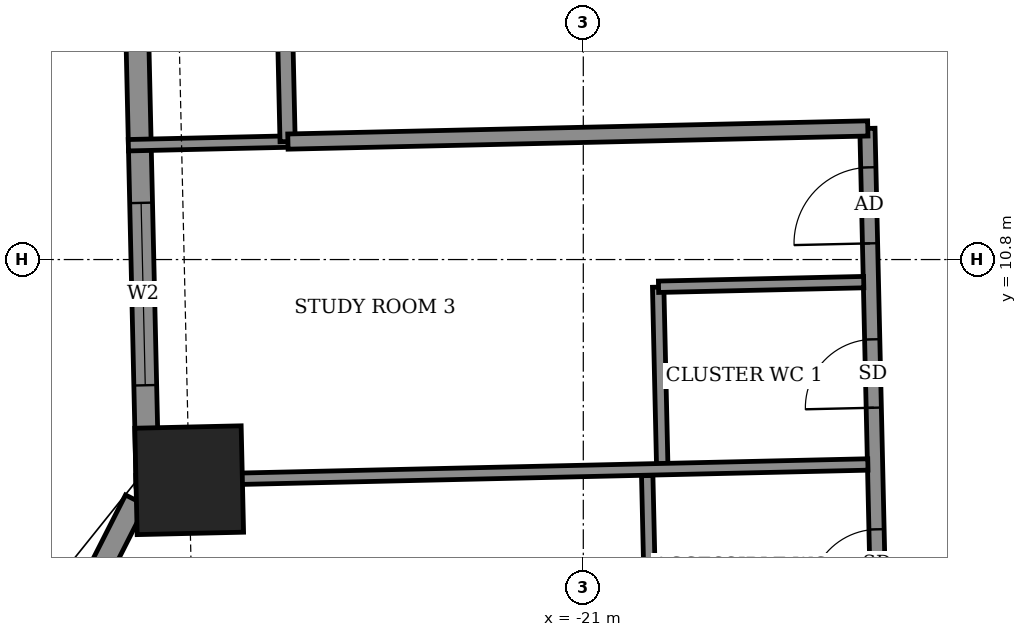
"""IFC4 building model, lengths in metres.
Left out: names, types, materials, properties, quantities, classifications, styles, units other than length and angle.
Written with IfcOpenShell. Run it as: python <this file> out.ifc"""

import sys

from ifc_helpers import new_model, si_unit, direction, frame, frame_2d, origin, origin_2d, place, context, subcontext, project, spatial, rectangle, extrude, element, fill, save


model = new_model("IFC4")
c1 = context("Model", 3, precision=1e-05, world=origin(), true_north=direction((0.0, 1.0)))
c2 = subcontext(c1, "Body", "Model", "MODEL_VIEW")
j1 = project(units=[si_unit("LENGTHUNIT", "METRE"), si_unit("PLANEANGLEUNIT", "RADIAN")], contexts=[c1])
p1 = place(None, origin())
s1 = spatial("IfcSite", under=j1, at=p1, CompositionType="ELEMENT")
p2 = place(p1, origin())
s2 = spatial("IfcBuilding", under=s1, at=p2, CompositionType="ELEMENT")
p3 = place(p2, frame((0.0, 0.0, 93.7)))
s3 = spatial("IfcBuildingStorey", under=s2, at=p3, CompositionType="ELEMENT", Elevation=93.7)
p4 = place(p3, frame((-26.185, 7.897, -0.55), z_axis=(0.0, 0.0, 1.0), x_axis=(0.022675887158, -0.999742869013, 0.0)))
e1 = element("IfcColumn", 1, at=p4, inside=s3, PredefinedType="COLUMN", context=c2, shape_type="SweptSolid", body=[
    extrude(rectangle(XDim=1.4, YDim=1.4, at=origin_2d()), origin(), (0.0, 0.0, 1.0), 3.6),
])
p5 = place(p3, frame((-27.036, 21.155, 0.0), z_axis=(0.0, 0.0, 1.0), x_axis=(0.022730142562, -0.999741636934, 0.0)))
e2 = element("IfcWall", 2, at=p5, inside=s3, PredefinedType="SOLIDWALL", context=c2, shape_type="SweptSolid", body=[
    extrude(rectangle(XDim=13.329, YDim=0.3, at=frame_2d((6.665, 0.0))), origin(), (0.0, 0.0, 1.0), 3.05),
])
p6 = place(p5, frame((2.805, 0.0, 0.0)))
e3 = element("IfcOpeningElement", 3, at=p6, cuts=e2, PredefinedType="OPENING", context=c2, shape_type="SweptSolid", body=[
    extrude(rectangle(XDim=1.5, YDim=2.4, at=frame_2d((0.75, 1.2))), frame((0.0, 0.16, 0.0), z_axis=(0.0, -1.0, 0.0), x_axis=(1.0, 0.0, 0.0)), (0.0, 0.0, 1.0), 0.32),
])
p7 = place(p5, frame((9.612, 0.0, 0.9)))
e4 = element("IfcOpeningElement", 4, at=p7, cuts=e2, PredefinedType="OPENING", context=c2, shape_type="SweptSolid", body=[
    extrude(rectangle(XDim=2.4, YDim=1.5, at=frame_2d((1.2, 0.75))), frame((0.0, 0.16, 0.0), z_axis=(0.0, -1.0, 0.0), x_axis=(1.0, 0.0, 0.0)), (0.0, 0.0, 1.0), 0.32),
])
p8 = place(p3, frame((-26.889, 7.635, 0.0), z_axis=(0.0, 0.0, 1.0), x_axis=(-0.452633159278, -0.891696822425, 0.0)))
e5 = element("IfcWall", 5, at=p8, inside=s3, PredefinedType="SOLIDWALL", context=c2, shape_type="SweptSolid", body=[
    extrude(rectangle(XDim=5.397, YDim=0.3, at=frame_2d((2.699, 0.0))), origin(), (0.0, 0.0, 1.0), 3.05),
])
p9 = place(p8, frame((2.007, 0.0, 0.9)))
e6 = element("IfcOpeningElement", 6, at=p9, cuts=e5, PredefinedType="OPENING", context=c2, shape_type="SweptSolid", body=[
    extrude(rectangle(XDim=1.2, YDim=1.5, at=frame_2d((0.6, 0.75))), frame((0.0, 0.16, 0.0), z_axis=(0.0, -1.0, 0.0), x_axis=(1.0, 0.0, 0.0)), (0.0, 0.0, 1.0), 0.32),
])
p10 = place(p3, frame((-16.684, -12.919, 0.0), z_axis=(0.0, 0.0, 1.0), x_axis=(-0.022706151961, 0.999742182097, 0.0)))
e7 = element("IfcWall", 7, at=p10, inside=s3, PredefinedType="PARTITIONING", context=c2, shape_type="SweptSolid", body=[
    extrude(rectangle(XDim=25.45, YDim=0.2, at=frame_2d((12.725, 0.0))), origin(), (0.0, 0.0, 1.0), 3.05),
])
p11 = place(p10, frame((23.938, 0.0, 0.0)))
e8 = element("IfcOpeningElement", 8, at=p11, cuts=e7, PredefinedType="OPENING", context=c2, shape_type="SweptSolid", body=[
    extrude(rectangle(XDim=1.0, YDim=2.1, at=frame_2d((0.5, 1.05))), frame((0.0, 0.11, 0.0), z_axis=(0.0, -1.0, 0.0), x_axis=(1.0, 0.0, 0.0)), (0.0, 0.0, 1.0), 0.22),
])
p12 = place(p10, frame((21.775, 0.0, 0.0)))
e9 = element("IfcOpeningElement", 9, at=p12, cuts=e7, PredefinedType="OPENING", context=c2, shape_type="SweptSolid", body=[
    extrude(rectangle(XDim=0.9, YDim=2.1, at=frame_2d((0.45, 1.05))), frame((0.0, 0.11, 0.0), z_axis=(0.0, -1.0, 0.0), x_axis=(1.0, 0.0, 0.0)), (0.0, 0.0, 1.0), 0.22),
])
p13 = place(p10, frame((16.975, 0.0, 0.0)))
e10 = element("IfcOpeningElement", 10, at=p13, cuts=e7, PredefinedType="OPENING", context=c2, shape_type="SweptSolid", body=[
    extrude(rectangle(XDim=1.0, YDim=2.1, at=frame_2d((0.5, 1.05))), frame((0.0, 0.11, 0.0), z_axis=(0.0, -1.0, 0.0), x_axis=(1.0, 0.0, 0.0)), (0.0, 0.0, 1.0), 0.22),
])
p14 = place(p10, frame((19.275, 0.0, 0.0)))
e11 = element("IfcOpeningElement", 11, at=p14, cuts=e7, PredefinedType="OPENING", context=c2, shape_type="SweptSolid", body=[
    extrude(rectangle(XDim=0.9, YDim=2.1, at=frame_2d((0.45, 1.05))), frame((0.0, 0.11, 0.0), z_axis=(0.0, -1.0, 0.0), x_axis=(1.0, 0.0, 0.0)), (0.0, 0.0, 1.0), 0.22),
])
p15 = place(p10, frame((15.075, 0.0, 0.0)))
e12 = element("IfcOpeningElement", 12, at=p15, cuts=e7, PredefinedType="OPENING", context=c2, shape_type="SweptSolid", body=[
    extrude(rectangle(XDim=1.0, YDim=2.1, at=frame_2d((0.5, 1.05))), frame((0.0, 0.11, 0.0), z_axis=(0.0, -1.0, 0.0), x_axis=(1.0, 0.0, 0.0)), (0.0, 0.0, 1.0), 0.22),
])
p16 = place(p10, frame((12.975, 0.0, 0.0)))
e13 = element("IfcOpeningElement", 13, at=p16, cuts=e7, PredefinedType="OPENING", context=c2, shape_type="SweptSolid", body=[
    extrude(rectangle(XDim=0.9, YDim=2.1, at=frame_2d((0.45, 1.05))), frame((0.0, 0.11, 0.0), z_axis=(0.0, -1.0, 0.0), x_axis=(1.0, 0.0, 0.0)), (0.0, 0.0, 1.0), 0.22),
])
p17 = place(p10, frame((10.55, 0.0, 0.0)))
e14 = element("IfcOpeningElement", 14, at=p17, cuts=e7, PredefinedType="OPENING", context=c2, shape_type="SweptSolid", body=[
    extrude(rectangle(XDim=1.0, YDim=2.1, at=frame_2d((0.5, 1.05))), frame((0.0, 0.11, 0.0), z_axis=(0.0, -1.0, 0.0), x_axis=(1.0, 0.0, 0.0)), (0.0, 0.0, 1.0), 0.22),
])
p18 = place(p10, frame((8.125, 0.0, 0.0)))
e15 = element("IfcOpeningElement", 15, at=p18, cuts=e7, PredefinedType="OPENING", context=c2, shape_type="SweptSolid", body=[
    extrude(rectangle(XDim=0.9, YDim=2.1, at=frame_2d((0.45, 1.05))), frame((0.0, 0.11, 0.0), z_axis=(0.0, -1.0, 0.0), x_axis=(1.0, 0.0, 0.0)), (0.0, 0.0, 1.0), 0.22),
])
p19 = place(p10, frame((1.737, 0.0, 0.0)))
e16 = element("IfcOpeningElement", 16, at=p19, cuts=e7, PredefinedType="OPENING", context=c2, shape_type="SweptSolid", body=[
    extrude(rectangle(XDim=1.0, YDim=2.1, at=frame_2d((0.5, 1.05))), frame((0.0, 0.11, 0.0), z_axis=(0.0, -1.0, 0.0), x_axis=(1.0, 0.0, 0.0)), (0.0, 0.0, 1.0), 0.22),
])
p20 = place(p10, frame((5.425, 0.0, 0.0)))
e17 = element("IfcOpeningElement", 17, at=p20, cuts=e7, PredefinedType="OPENING", context=c2, shape_type="SweptSolid", body=[
    extrude(rectangle(XDim=0.9, YDim=2.1, at=frame_2d((0.45, 1.05))), frame((0.0, 0.11, 0.0), z_axis=(0.0, -1.0, 0.0), x_axis=(1.0, 0.0, 0.0)), (0.0, 0.0, 1.0), 0.22),
])
p21 = place(p3, frame((-20.101, 5.434, 0.0), z_axis=(0.0, 0.0, 1.0), x_axis=(-0.022919108675, 0.999737322729, 0.0)))
e18 = element("IfcWall", 18, at=p21, inside=s3, PredefinedType="PARTITIONING", context=c2, shape_type="SweptSolid", body=[
    extrude(rectangle(XDim=2.525, YDim=0.15, at=frame_2d((1.262, 0.0))), origin(), (0.0, 0.0, 1.0), 3.05),
])
p22 = place(p3, frame((-19.962, 8.112, 0.0), z_axis=(0.0, 0.0, 1.0), x_axis=(-0.022781023197, 0.999740478815, 0.0)))
e19 = element("IfcWall", 19, at=p22, inside=s3, PredefinedType="PARTITIONING", context=c2, shape_type="SweptSolid", body=[
    extrude(rectangle(XDim=2.325, YDim=0.15, at=frame_2d((1.163, 0.0))), origin(), (0.0, 0.0, 1.0), 3.05),
])
p23 = place(p3, frame((-26.885, 7.885, 0.0), z_axis=(0.0, 0.0, 1.0), x_axis=(0.999741468995, 0.022737527832, 0.0)))
e20 = element("IfcWall", 20, at=p23, inside=s3, PredefinedType="PARTITIONING", context=c2, shape_type="SweptSolid", body=[
    extrude(rectangle(XDim=9.631, YDim=0.15, at=frame_2d((4.816, 0.0))), origin(), (0.0, 0.0, 1.0), 3.05),
])
p24 = place(p3, frame((-20.01, 10.442, 0.0), z_axis=(0.0, 0.0, 1.0), x_axis=(0.999744396973, 0.02260842146, 0.0)))
e21 = element("IfcWall", 21, at=p24, inside=s3, PredefinedType="PARTITIONING", context=c2, shape_type="SweptSolid", body=[
    extrude(rectangle(XDim=2.7, YDim=0.15, at=frame_2d((1.35, 0.0))), origin(), (0.0, 0.0, 1.0), 3.05),
])
p25 = place(p3, frame((-26.985, 12.304, 0.0), z_axis=(0.0, 0.0, 1.0), x_axis=(0.999738589876, 0.02286376854, 0.0)))
e22 = element("IfcWall", 22, at=p25, inside=s3, PredefinedType="PARTITIONING", context=c2, shape_type="SweptSolid", body=[
    extrude(rectangle(XDim=2.104, YDim=0.15, at=frame_2d((1.052, 0.0))), origin(), (0.0, 0.0, 1.0), 2.55),
])
p26 = place(p3, frame((-24.89, 12.352, 0.0), z_axis=(0.0, 0.0, 1.0), x_axis=(-0.02279537805, 0.999740151609, 0.0)))
e23 = element("IfcWall", 23, at=p26, inside=s3, PredefinedType="PARTITIONING", context=c2, shape_type="SweptSolid", body=[
    extrude(rectangle(XDim=1.5, YDim=0.2, at=frame_2d((0.75, 0.0))), origin(), (0.0, 0.0, 1.0), 3.05),
])
p27 = place(p3, frame((-24.886, 12.352, 0.0), z_axis=(0.0, 0.0, 1.0), x_axis=(0.999743418763, 0.0226516366, 0.0)))
e24 = element("IfcWall", 24, at=p27, inside=s3, PredefinedType="PARTITIONING", context=c2, shape_type="SweptSolid", body=[
    extrude(rectangle(XDim=7.631, YDim=0.2, at=frame_2d((3.815, 0.0))), origin(), (0.0, 0.0, 1.0), 3.05),
])
p28 = place(p7, origin())
e25 = element("IfcWindow", 25, at=p28, inside=s3, PartitioningType="DOUBLE_PANEL_VERTICAL", PredefinedType="WINDOW", context=c2, shape_type="SweptSolid", body=[
    extrude(rectangle(XDim=2.4, YDim=1.5, at=frame_2d((1.2, 0.75))), frame((0.0, 0.03, 0.0), z_axis=(0.0, -1.0, 0.0), x_axis=(1.0, 0.0, 0.0)), (0.0, 0.0, 1.0), 0.06),
])
fill(e4, e25)
p29 = place(p11, origin())
e26 = element("IfcDoor", 26, at=p29, inside=s3, OperationType="SINGLE_SWING_LEFT", PredefinedType="DOOR", context=c2, shape_type="SweptSolid", body=[
    extrude(rectangle(XDim=1.0, YDim=2.1, at=frame_2d((0.5, 1.05))), frame((0.0, 0.025, 0.0), z_axis=(0.0, -1.0, 0.0), x_axis=(1.0, 0.0, 0.0)), (0.0, 0.0, 1.0), 0.05),
])
fill(e8, e26)
p30 = place(p12, origin())
e27 = element("IfcDoor", 27, at=p30, inside=s3, OperationType="SINGLE_SWING_LEFT", PredefinedType="DOOR", context=c2, shape_type="SweptSolid", body=[
    extrude(rectangle(XDim=0.9, YDim=2.1, at=frame_2d((0.45, 1.05))), frame((0.0, 0.025, 0.0), z_axis=(0.0, -1.0, 0.0), x_axis=(1.0, 0.0, 0.0)), (0.0, 0.0, 1.0), 0.05),
])
fill(e9, e27)
p31 = place(p14, origin())
e28 = element("IfcDoor", 28, at=p31, inside=s3, OperationType="SINGLE_SWING_RIGHT", PredefinedType="DOOR", context=c2, shape_type="SweptSolid", body=[
    extrude(rectangle(XDim=0.9, YDim=2.1, at=frame_2d((0.45, 1.05))), frame((0.0, 0.025, 0.0), z_axis=(0.0, -1.0, 0.0), x_axis=(1.0, 0.0, 0.0)), (0.0, 0.0, 1.0), 0.05),
])
fill(e11, e28)
save(model, sys.argv[1])
